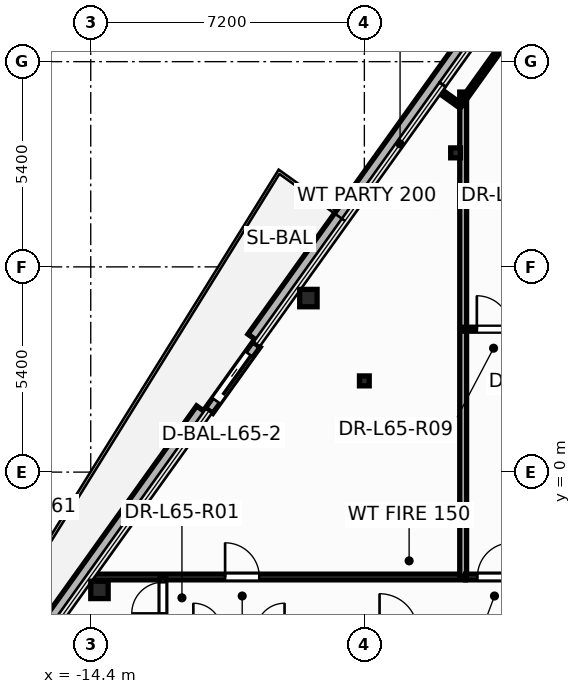
"""IFC4 building model, lengths in metres.
Left out: names, types, materials, properties, quantities, classifications, styles, units other than length and angle.
Written with IfcOpenShell. Run it as: python <this file> out.ifc"""

import sys

from ifc_helpers import new_model, si_unit, direction, frame, frame_2d, origin, origin_2d, place, context, subcontext, project, spatial, rectangle, hollow_circle, i_section, extrude, element, fill, save


model = new_model("IFC4")
c1 = context("Model", 3, precision=1e-05, world=origin(), true_north=direction((0.0, 1.0)))
c2 = subcontext(c1, "Body", "Model", "MODEL_VIEW")
j1 = project(units=[si_unit("LENGTHUNIT", "METRE"), si_unit("PLANEANGLEUNIT", "RADIAN")], contexts=[c1])
p1 = place(None, origin())
s1 = spatial("IfcSite", under=j1, at=p1, CompositionType="ELEMENT")
p2 = place(p1, origin())
s2 = spatial("IfcBuilding", under=s1, at=p2, CompositionType="ELEMENT")
p3 = place(p2, frame((0.0, 0.0, 249.0)))
s3 = spatial("IfcBuildingStorey", under=s2, at=p3, CompositionType="ELEMENT", Elevation=249.0)
for number, where, z_axis, x_axis in (
    (1, (-8.673, 4.579, 0.0), (0.0, 0.0, 1.0), (1.0, 0.0, 0.0)),
    (2, (-14.171, -3.099, 0.0), (0.0, 0.0, 1.0), (1.0, 0.0, 0.0)),
):
    element("IfcColumn", number, at=place(p3, frame(where, z_axis=z_axis, x_axis=x_axis)), inside=s3, PredefinedType="COLUMN", context=c2, shape_type="SweptSolid", body=[
        extrude(hollow_circle(Radius=0.229, WallThickness=0.016, at=origin_2d()), origin(), (0.0, 0.0, 1.0), 3.6),
    ])
for number, where, z_axis, x_axis in (
    (3, (-7.2, 2.4, 0.0), (0.0, 0.0, 1.0), (1.0, 0.0, 0.0)),
    (4, (-4.8, 8.4, 0.0), (0.0, 0.0, 1.0), (1.0, 0.0, 0.0)),
):
    element("IfcColumn", number, at=place(p3, frame(where, z_axis=z_axis, x_axis=x_axis)), inside=s3, PredefinedType="COLUMN", context=c2, shape_type="SweptSolid", body=[
        extrude(i_section(OverallWidth=0.256, OverallDepth=0.26, WebThickness=0.01, FlangeThickness=0.017, at=origin_2d()), origin(), (0.0, 0.0, 1.0), 3.6),
    ])
p4 = place(p3, frame((-2.664, 13.932, -0.2), z_axis=(0.0, 0.0, 1.0), x_axis=(-0.582199295351, -0.813046112156, 0.0)))
e5 = element("IfcWall", 5, at=p4, inside=s3, PredefinedType="PARAPET", context=c2, shape_type="SweptSolid", body=[
    extrude(rectangle(XDim=12.802, YDim=0.36, at=frame_2d((6.401, 0.0))), origin(), (0.0, 0.0, 1.0), 0.38),
])
p5 = place(p3, frame((-11.468, 1.637, -0.2), z_axis=(0.0, 0.0, 1.0), x_axis=(-0.582200027891, -0.813045587605, 0.0)))
e6 = element("IfcWall", 6, at=p5, inside=s3, PredefinedType="PARAPET", context=c2, shape_type="SweptSolid", body=[
    extrude(rectangle(XDim=16.608, YDim=0.36, at=frame_2d((8.304, 0.0))), origin(), (0.0, 0.0, 1.0), 0.38),
])
p6 = place(p3, frame((-10.039, 3.357, -0.015), z_axis=(0.0, 0.0, 1.0), x_axis=(-0.58216589686, -0.813070026832, 0.0)))
e7 = element("IfcWall", 7, at=p6, inside=s3, PredefinedType="STANDARD", context=c2, shape_type="SweptSolid", body=[
    extrude(rectangle(XDim=2.14, YDim=0.24, at=frame_2d((1.07, 0.0))), origin(), (0.0, 0.0, 1.0), 2.878),
])
p7 = place(p6, frame((0.32, 0.0, 0.015)))
e8 = element("IfcOpeningElement", 8, at=p7, cuts=e7, PredefinedType="OPENING", context=c2, shape_type="SweptSolid", body=[
    extrude(rectangle(XDim=1.506, YDim=2.204, at=frame_2d((0.75, 1.102))), frame((0.0, 0.13, 0.0), z_axis=(0.0, -1.0, 0.0), x_axis=(1.0, 0.0, 0.0)), (0.0, 0.0, 1.0), 0.26),
])
p8 = place(p3, frame((-14.42, -2.76, 0.0), z_axis=(0.0, 0.0, 1.0), x_axis=(1.0, 0.0, 0.0)))
e9 = element("IfcWall", 9, at=p8, inside=s3, PredefinedType="PARTITIONING", context=c2, shape_type="SweptSolid", body=[
    extrude(rectangle(XDim=9.88, YDim=0.15, at=frame_2d((4.94, 0.0))), origin(), (0.0, 0.0, 1.0), 2.32),
])
p9 = place(p8, frame((3.555, 0.0, 0.0)))
e10 = element("IfcOpeningElement", 10, at=p9, cuts=e9, PredefinedType="OPENING", context=c2, shape_type="SweptSolid", body=[
    extrude(rectangle(XDim=0.906, YDim=2.104, at=frame_2d((0.45, 1.052))), frame((0.0, 0.085, 0.0), z_axis=(0.0, -1.0, 0.0), x_axis=(1.0, 0.0, 0.0)), (0.0, 0.0, 1.0), 0.17),
])
p10 = place(p3, frame((-4.6, -2.74, 0.0), z_axis=(0.0, 0.0, 1.0), x_axis=(0.0, 1.0, 0.0)))
e11 = element("IfcWall", 11, at=p10, inside=s3, PredefinedType="PARTITIONING", context=c2, shape_type="SweptSolid", body=[
    extrude(rectangle(XDim=12.74, YDim=0.18, at=frame_2d((6.37, 0.0))), origin(), (0.0, 0.0, 1.0), 2.32),
])
p11 = place(p3, frame((-4.538, -2.76, 0.0), z_axis=(0.0, 0.0, 1.0), x_axis=(1.0, 0.0, 0.0)))
e12 = element("IfcWall", 12, at=p11, inside=s3, PredefinedType="PARTITIONING", context=c2, shape_type="SweptSolid", body=[
    extrude(rectangle(XDim=3.098, YDim=0.15, at=frame_2d((1.549, 0.0))), origin(), (0.0, 0.0, 1.0), 2.964),
])
p12 = place(p11, frame((0.312, 0.0, 0.0)))
e13 = element("IfcOpeningElement", 13, at=p12, cuts=e12, PredefinedType="OPENING", context=c2, shape_type="SweptSolid", body=[
    extrude(rectangle(XDim=0.906, YDim=2.104, at=frame_2d((0.45, 1.052))), frame((0.0, 0.085, 0.0), z_axis=(0.0, -1.0, 0.0), x_axis=(1.0, 0.0, 0.0)), (0.0, 0.0, 1.0), 0.17),
])
p13 = place(p3, frame((-4.6, 3.76, 0.0), z_axis=(0.0, 0.0, 1.0), x_axis=(1.0, 0.0, 0.0)))
e14 = element("IfcWall", 14, at=p13, inside=s3, PredefinedType="PARTITIONING", context=c2, shape_type="SweptSolid", body=[
    extrude(rectangle(XDim=2.6, YDim=0.105, at=frame_2d((1.3, 0.0))), origin(), (0.0, 0.0, 1.0), 2.964),
])
p14 = place(p13, frame((0.36, 0.0, 0.0)))
e15 = element("IfcOpeningElement", 15, at=p14, cuts=e14, PredefinedType="OPENING", context=c2, shape_type="SweptSolid", body=[
    extrude(rectangle(XDim=0.886, YDim=2.104, at=frame_2d((0.44, 1.052))), frame((0.0, 0.062, 0.0), z_axis=(0.0, -1.0, 0.0), x_axis=(1.0, 0.0, 0.0)), (0.0, 0.0, 1.0), 0.125),
])
p15 = place(p3, frame((-3.26, 11.657, 0.0), z_axis=(0.0, 0.0, 1.0), x_axis=(-0.582138732025, -0.813089476427, 0.0)))
e16 = element("IfcWall", 16, at=p15, inside=s3, PredefinedType="PARTITIONING", context=c2, shape_type="SweptSolid", body=[
    extrude(rectangle(XDim=2.461, YDim=0.12, at=frame_2d((1.23, 0.0))), origin(), (0.0, 0.0, 1.0), 2.718),
])
p16 = place(p3, frame((-12.5, -4.24, 0.0), z_axis=(0.0, 0.0, 1.0), x_axis=(0.0, 1.0, 0.0)))
e17 = element("IfcWall", 17, at=p16, inside=s3, PredefinedType="PARTITIONING", context=c2, shape_type="SweptSolid", body=[
    extrude(rectangle(XDim=1.48, YDim=0.15, at=frame_2d((0.74, 0.0))), origin(), (0.0, 0.0, 1.0), 2.32),
])
p17 = place(p16, frame((0.522, 0.0, 0.0)))
e18 = element("IfcOpeningElement", 18, at=p17, cuts=e17, PredefinedType="OPENING", context=c2, shape_type="SweptSolid", body=[
    extrude(rectangle(XDim=0.826, YDim=2.104, at=frame_2d((0.41, 1.052))), frame((0.0, 0.085, 0.0), z_axis=(0.0, -1.0, 0.0), x_axis=(1.0, 0.0, 0.0)), (0.0, 0.0, 1.0), 0.17),
])
p18 = place(p3, frame((-4.693, 9.656, 0.0), z_axis=(0.0, 0.0, 1.0), x_axis=(-0.813093010833, 0.58213379539, 0.0)))
e19 = element("IfcWall", 19, at=p18, inside=s3, PredefinedType="PARTITIONING", context=c2, shape_type="SweptSolid", body=[
    extrude(rectangle(XDim=0.67, YDim=0.12, at=frame_2d((0.335, 0.0))), origin(), (0.0, 0.0, 1.0), 2.863),
])
p19 = place(p7, origin())
e20 = element("IfcDoor", 20, at=p19, inside=s3, OperationType="SLIDING_TO_RIGHT", PredefinedType="DOOR", context=c2, shape_type="SweptSolid", body=[
    extrude(rectangle(XDim=1.5, YDim=2.2, at=frame_2d((0.75, 1.1))), frame((0.0, 0.025, 0.0), z_axis=(0.0, -1.0, 0.0), x_axis=(1.0, 0.0, 0.0)), (0.0, 0.0, 1.0), 0.05),
])
fill(e8, e20)
p20 = place(p17, origin())
e21 = element("IfcDoor", 21, at=p20, inside=s3, OperationType="SINGLE_SWING_LEFT", PredefinedType="DOOR", context=c2, shape_type="SweptSolid", body=[
    extrude(rectangle(XDim=0.82, YDim=2.1, at=frame_2d((0.41, 1.05))), frame((0.0, 0.025, 0.0), z_axis=(0.0, -1.0, 0.0), x_axis=(1.0, 0.0, 0.0)), (0.0, 0.0, 1.0), 0.05),
])
fill(e18, e21)
p21 = place(p9, origin())
e22 = element("IfcDoor", 22, at=p21, inside=s3, OperationType="SINGLE_SWING_LEFT", PredefinedType="DOOR", context=c2, shape_type="SweptSolid", body=[
    extrude(rectangle(XDim=0.9, YDim=2.1, at=frame_2d((0.45, 1.05))), frame((0.0, 0.025, 0.0), z_axis=(0.0, -1.0, 0.0), x_axis=(1.0, 0.0, 0.0)), (0.0, 0.0, 1.0), 0.05),
])
fill(e10, e22)
p22 = place(p12, origin())
e23 = element("IfcDoor", 23, at=p22, inside=s3, OperationType="SINGLE_SWING_RIGHT", PredefinedType="DOOR", context=c2, shape_type="SweptSolid", body=[
    extrude(rectangle(XDim=0.9, YDim=2.1, at=frame_2d((0.45, 1.05))), frame((0.0, 0.025, 0.0), z_axis=(0.0, -1.0, 0.0), x_axis=(1.0, 0.0, 0.0)), (0.0, 0.0, 1.0), 0.05),
])
fill(e13, e23)
p23 = place(p14, origin())
e24 = element("IfcDoor", 24, at=p23, inside=s3, OperationType="SINGLE_SWING_LEFT", PredefinedType="DOOR", context=c2, shape_type="SweptSolid", body=[
    extrude(rectangle(XDim=0.88, YDim=2.1, at=frame_2d((0.44, 1.05))), frame((0.0, 0.025, 0.0), z_axis=(0.0, -1.0, 0.0), x_axis=(1.0, 0.0, 0.0)), (0.0, 0.0, 1.0), 0.05),
])
fill(e15, e24)
save(model, sys.argv[1])
